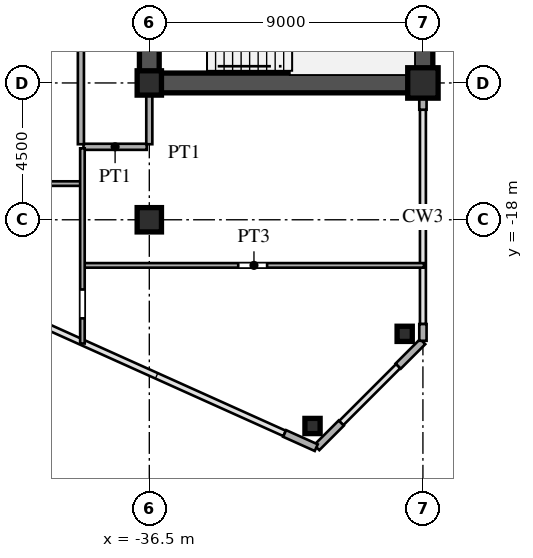
"""IFC4 building model, lengths in metres.
Left out: names, types, materials, properties, quantities, classifications, styles, units other than length and angle.
Written with IfcOpenShell. Run it as: python <this file> out.ifc"""

import sys

from ifc_helpers import new_model, si_unit, direction, frame, frame_2d, origin, origin_2d, place, context, subcontext, project, spatial, rectangle, hollow_rectangle, i_section, extrude, source, transform, mapped, element, save


model = new_model("IFC4")
c1 = context("Model", 3, precision=1e-05, world=origin(), true_north=direction((0.0, 1.0)))
c2 = subcontext(c1, "Body", "Model", "MODEL_VIEW")
j1 = project(units=[si_unit("LENGTHUNIT", "METRE"), si_unit("PLANEANGLEUNIT", "RADIAN")], contexts=[c1])
p1 = place(None, origin())
s1 = spatial("IfcSite", under=j1, at=p1, CompositionType="ELEMENT")
p2 = place(p1, origin())
s2 = spatial("IfcBuilding", under=s1, at=p2, CompositionType="ELEMENT")
p3 = place(p2, frame((0.0, 0.0, 62.1)))
s3 = spatial("IfcBuildingStorey", under=s2, at=p3, CompositionType="ELEMENT", Elevation=62.1)
m1 = source(origin(), c2, "Body", "SweptSolid", [
    extrude(hollow_rectangle(XDim=1.0, YDim=1.0, WallThickness=0.042, at=origin_2d()), origin(), (0.0, 0.0, 1.0), 3.6),
])
p4 = place(p3, frame((-27.5, -13.5, 0.0), z_axis=(0.0, 0.0, 1.0), x_axis=(1.0, 0.0, 0.0)))
e1 = element("IfcColumn", 1, at=p4, inside=s3, PredefinedType="COLUMN", context=c2, shape_type="MappedRepresentation", body=[
    mapped(m1, transform((0.0, 0.0, 0.0), scale=1.0)),
])
m2 = source(origin(), c2, "Body", "SweptSolid", [
    extrude(i_section(OverallWidth=0.8, OverallDepth=0.8, WebThickness=0.032, FlangeThickness=0.05, at=origin_2d()), origin(), (0.0, 0.0, 1.0), 3.6),
])
for number, where, z_axis, x_axis in (
    (2, (-36.5, -18.0, 0.0), (0.0, 0.0, 1.0), (1.0, 0.0, 0.0)),
    (3, (-36.5, -13.5, 0.0), (0.0, 0.0, 1.0), (1.0, 0.0, 0.0)),
):
    element("IfcColumn", number, at=place(p3, frame(where, z_axis=z_axis, x_axis=x_axis)), inside=s3, PredefinedType="COLUMN", context=c2, shape_type="MappedRepresentation", body=[
        mapped(m2, transform((0.0, 0.0, 0.0), scale=1.0)),
    ])
m3 = source(origin(), c2, "Body", "SweptSolid", [
    extrude(hollow_rectangle(XDim=0.5, YDim=0.5, WallThickness=0.02, at=origin_2d()), origin(), (0.0, 0.0, 1.0), 3.6),
])
for number, where, z_axis, x_axis in (
    (4, (-28.1, -21.751, 0.0), (0.0, 0.0, 1.0), (1.0, 0.0, 0.0)),
    (5, (-31.131, -24.783, 0.0), (0.0, 0.0, 1.0), (1.0, 0.0, 0.0)),
):
    element("IfcColumn", number, at=place(p3, frame(where, z_axis=z_axis, x_axis=x_axis)), inside=s3, PredefinedType="COLUMN", context=c2, shape_type="MappedRepresentation", body=[
        mapped(m3, transform((0.0, 0.0, 0.0), scale=1.0)),
    ])
p5 = place(p3, frame((-27.5, -21.98, 0.0), z_axis=(0.0, 0.0, 1.0), x_axis=(0.0, 1.0, 0.0)))
e6 = element("IfcWall", 6, at=p5, inside=s3, PredefinedType="SOLIDWALL", context=c2, shape_type="SweptSolid", body=[
    extrude(rectangle(XDim=0.55, YDim=0.24, at=frame_2d((0.275, 0.0))), origin(), (0.0, 0.0, 1.0), 3.38),
])
p6 = place(p3, frame((-27.5, -14.38, 0.0), z_axis=(0.0, 0.0, 1.0), x_axis=(0.0, 1.0, 0.0)))
e7 = element("IfcWall", 7, at=p6, inside=s3, PredefinedType="SOLIDWALL", context=c2, shape_type="SweptSolid", body=[
    extrude(rectangle(XDim=0.55, YDim=0.24, at=frame_2d((0.275, 0.0))), origin(), (0.0, 0.0, 1.0), 2.88),
])
p7 = place(p3, frame((-32.049, -25.028, 0.0), z_axis=(0.0, 0.0, 1.0), x_axis=(0.911929519623, -0.410346866979, 0.0)))
e8 = element("IfcWall", 8, at=p7, inside=s3, PredefinedType="SOLIDWALL", context=c2, shape_type="SweptSolid", body=[
    extrude(rectangle(XDim=1.14, YDim=0.24, at=frame_2d((0.57, 0.0))), origin(), (0.0, 0.0, 1.0), 3.38),
])
for number, where, z_axis, x_axis in (
    (9, (-30.993, -25.493, 0.0), (0.0, 0.0, 1.0), (0.707, 0.707, 0.0)),
    (10, (-28.313, -22.813, 0.0), (0.0, 0.0, 1.0), (0.707, 0.707, 0.0)),
):
    element("IfcWall", number, at=place(p3, frame(where, z_axis=z_axis, x_axis=x_axis)), inside=s3, PredefinedType="SOLIDWALL", context=c2, shape_type="SweptSolid", body=[
        extrude(rectangle(XDim=1.14, YDim=0.24, at=frame_2d((0.57, 0.0))), origin(), (0.0, 0.0, 1.0), 3.38),
    ])
p8 = place(p3, frame((-27.5, -13.5, 0.0), z_axis=(0.0, 0.0, 1.0), x_axis=(0.0, 1.0, 0.0)))
e11 = element("IfcWall", 11, at=p8, inside=s3, PredefinedType="SHEAR", context=c2, shape_type="SweptSolid", body=[
    extrude(rectangle(XDim=12.2, YDim=0.65, at=frame_2d((6.1, 0.0))), origin(), (0.0, 0.0, 1.0), 3.38),
])
p9 = place(p3, frame((-36.5, -13.5, 0.0), z_axis=(0.0, 0.0, 1.0), x_axis=(1.0, 0.0, 0.0)))
e12 = element("IfcWall", 12, at=p9, inside=s3, PredefinedType="SHEAR", context=c2, shape_type="SweptSolid", body=[
    extrude(rectangle(XDim=9.0, YDim=0.65, at=frame_2d((4.5, 0.0))), origin(), (0.0, 0.0, 1.0), 3.38),
])
p10 = place(p3, frame((-36.5, -13.65, 0.0), z_axis=(0.0, 0.0, 1.0), x_axis=(0.0, 1.0, 0.0)))
e13 = element("IfcWall", 13, at=p10, inside=s3, PredefinedType="SHEAR", context=c2, shape_type="SweptSolid", body=[
    extrude(rectangle(XDim=7.15, YDim=0.65, at=frame_2d((3.575, 0.0))), origin(), (0.0, 0.0, 1.0), 3.38),
])
p11 = place(p10, frame((4.675, 0.0, 0.0)))
e14 = element("IfcOpeningElement", 14, at=p11, cuts=e13, PredefinedType="OPENING", context=c2, shape_type="SweptSolid", body=[
    extrude(rectangle(XDim=1.15, YDim=2.2, at=frame_2d((0.575, 1.1))), frame((0.0, 0.335, 0.0), z_axis=(0.0, -1.0, 0.0), x_axis=(1.0, 0.0, 0.0)), (0.0, 0.0, 1.0), 0.67),
])
p12 = place(p3, frame((-38.65, -19.5, 0.0), z_axis=(0.0, 0.0, 1.0), x_axis=(1.0, 0.0, 0.0)))
e15 = element("IfcWall", 15, at=p12, inside=s3, PredefinedType="PARTITIONING", context=c2, shape_type="SweptSolid", body=[
    extrude(rectangle(XDim=11.185, YDim=0.15, at=frame_2d((5.592, 0.0))), origin(), (0.0, 0.0, 1.0), 3.38),
])
p13 = place(p12, frame((5.075, 0.0, 0.0)))
e16 = element("IfcOpeningElement", 16, at=p13, cuts=e15, PredefinedType="OPENING", context=c2, shape_type="SweptSolid", body=[
    extrude(rectangle(XDim=0.95, YDim=2.15, at=frame_2d((0.475, 1.075))), frame((0.0, 0.085, 0.0), z_axis=(0.0, -1.0, 0.0), x_axis=(1.0, 0.0, 0.0)), (0.0, 0.0, 1.0), 0.17),
])
p14 = place(p3, frame((-43.8, -16.81, 0.0), z_axis=(0.0, 0.0, 1.0), x_axis=(1.0, 0.0, 0.0)))
e17 = element("IfcWall", 17, at=p14, inside=s3, PredefinedType="PARTITIONING", context=c2, shape_type="SweptSolid", body=[
    extrude(rectangle(XDim=5.05, YDim=0.15, at=frame_2d((2.525, 0.0))), origin(), (0.0, 0.0, 1.0), 3.38),
])
p15 = place(p3, frame((-38.665, -15.6, 0.0), z_axis=(0.0, 0.0, 1.0), x_axis=(1.0, 0.0, 0.0)))
e18 = element("IfcWall", 18, at=p15, inside=s3, PredefinedType="PARTITIONING", context=c2, shape_type="SweptSolid", body=[
    extrude(rectangle(XDim=2.08, YDim=0.2, at=frame_2d((1.04, 0.0))), origin(), (0.0, 0.0, 1.0), 3.38),
])
p16 = place(p3, frame((-38.75, -15.515, 0.0), z_axis=(0.0, 0.0, 1.0), x_axis=(0.0, 1.0, 0.0)))
e19 = element("IfcWall", 19, at=p16, inside=s3, PredefinedType="PARTITIONING", context=c2, shape_type="SweptSolid", body=[
    extrude(rectangle(XDim=31.03, YDim=0.2, at=frame_2d((15.515, 0.0))), origin(), (0.0, 0.0, 1.0), 3.38),
])
p17 = place(p16, frame((4.913, 0.0, 0.0)))
e20 = element("IfcOpeningElement", 20, at=p17, cuts=e19, PredefinedType="OPENING", context=c2, shape_type="SweptSolid", body=[
    extrude(rectangle(XDim=1.05, YDim=2.25, at=frame_2d((0.525, 1.125))), frame((0.0, 0.11, 0.0), z_axis=(0.0, -1.0, 0.0), x_axis=(1.0, 0.0, 0.0)), (0.0, 0.0, 1.0), 0.22),
])
p18 = place(p16, frame((17.28, 0.0, 0.0)))
e21 = element("IfcOpeningElement", 21, at=p18, cuts=e19, PredefinedType="OPENING", context=c2, shape_type="SweptSolid", body=[
    extrude(rectangle(XDim=1.05, YDim=2.25, at=frame_2d((0.525, 1.125))), frame((0.0, 0.11, 0.0), z_axis=(0.0, -1.0, 0.0), x_axis=(1.0, 0.0, 0.0)), (0.0, 0.0, 1.0), 0.22),
])
p19 = place(p16, frame((27.54, 0.0, 0.0)))
e22 = element("IfcOpeningElement", 22, at=p19, cuts=e19, PredefinedType="OPENING", context=c2, shape_type="SweptSolid", body=[
    extrude(rectangle(XDim=1.05, YDim=2.25, at=frame_2d((0.525, 1.125))), frame((0.0, 0.11, 0.0), z_axis=(0.0, -1.0, 0.0), x_axis=(1.0, 0.0, 0.0)), (0.0, 0.0, 1.0), 0.22),
])
p20 = place(p3, frame((-38.7, -22.07, 0.0), z_axis=(0.0, 0.0, 1.0), x_axis=(0.0, 1.0, 0.0)))
e23 = element("IfcWall", 23, at=p20, inside=s3, PredefinedType="PARTITIONING", context=c2, shape_type="SweptSolid", body=[
    extrude(rectangle(XDim=6.42, YDim=0.15, at=frame_2d((3.21, 0.0))), origin(), (0.0, 0.0, 1.0), 3.38),
])
p21 = place(p20, frame((0.827, 0.0, 0.0)))
e24 = element("IfcOpeningElement", 24, at=p21, cuts=e23, PredefinedType="OPENING", context=c2, shape_type="SweptSolid", body=[
    extrude(rectangle(XDim=0.95, YDim=2.15, at=frame_2d((0.475, 1.075))), frame((0.0, 0.085, 0.0), z_axis=(0.0, -1.0, 0.0), x_axis=(1.0, 0.0, 0.0)), (0.0, 0.0, 1.0), 0.17),
])
p22 = place(p3, frame((-36.5, -15.515, 0.0), z_axis=(0.0, 0.0, 1.0), x_axis=(0.0, 1.0, 0.0)))
e25 = element("IfcWall", 25, at=p22, inside=s3, PredefinedType="PARTITIONING", context=c2, shape_type="SweptSolid", body=[
    extrude(rectangle(XDim=1.685, YDim=0.2, at=frame_2d((0.842, 0.0))), origin(), (0.0, 0.0, 1.0), 2.68),
])
save(model, sys.argv[1])
